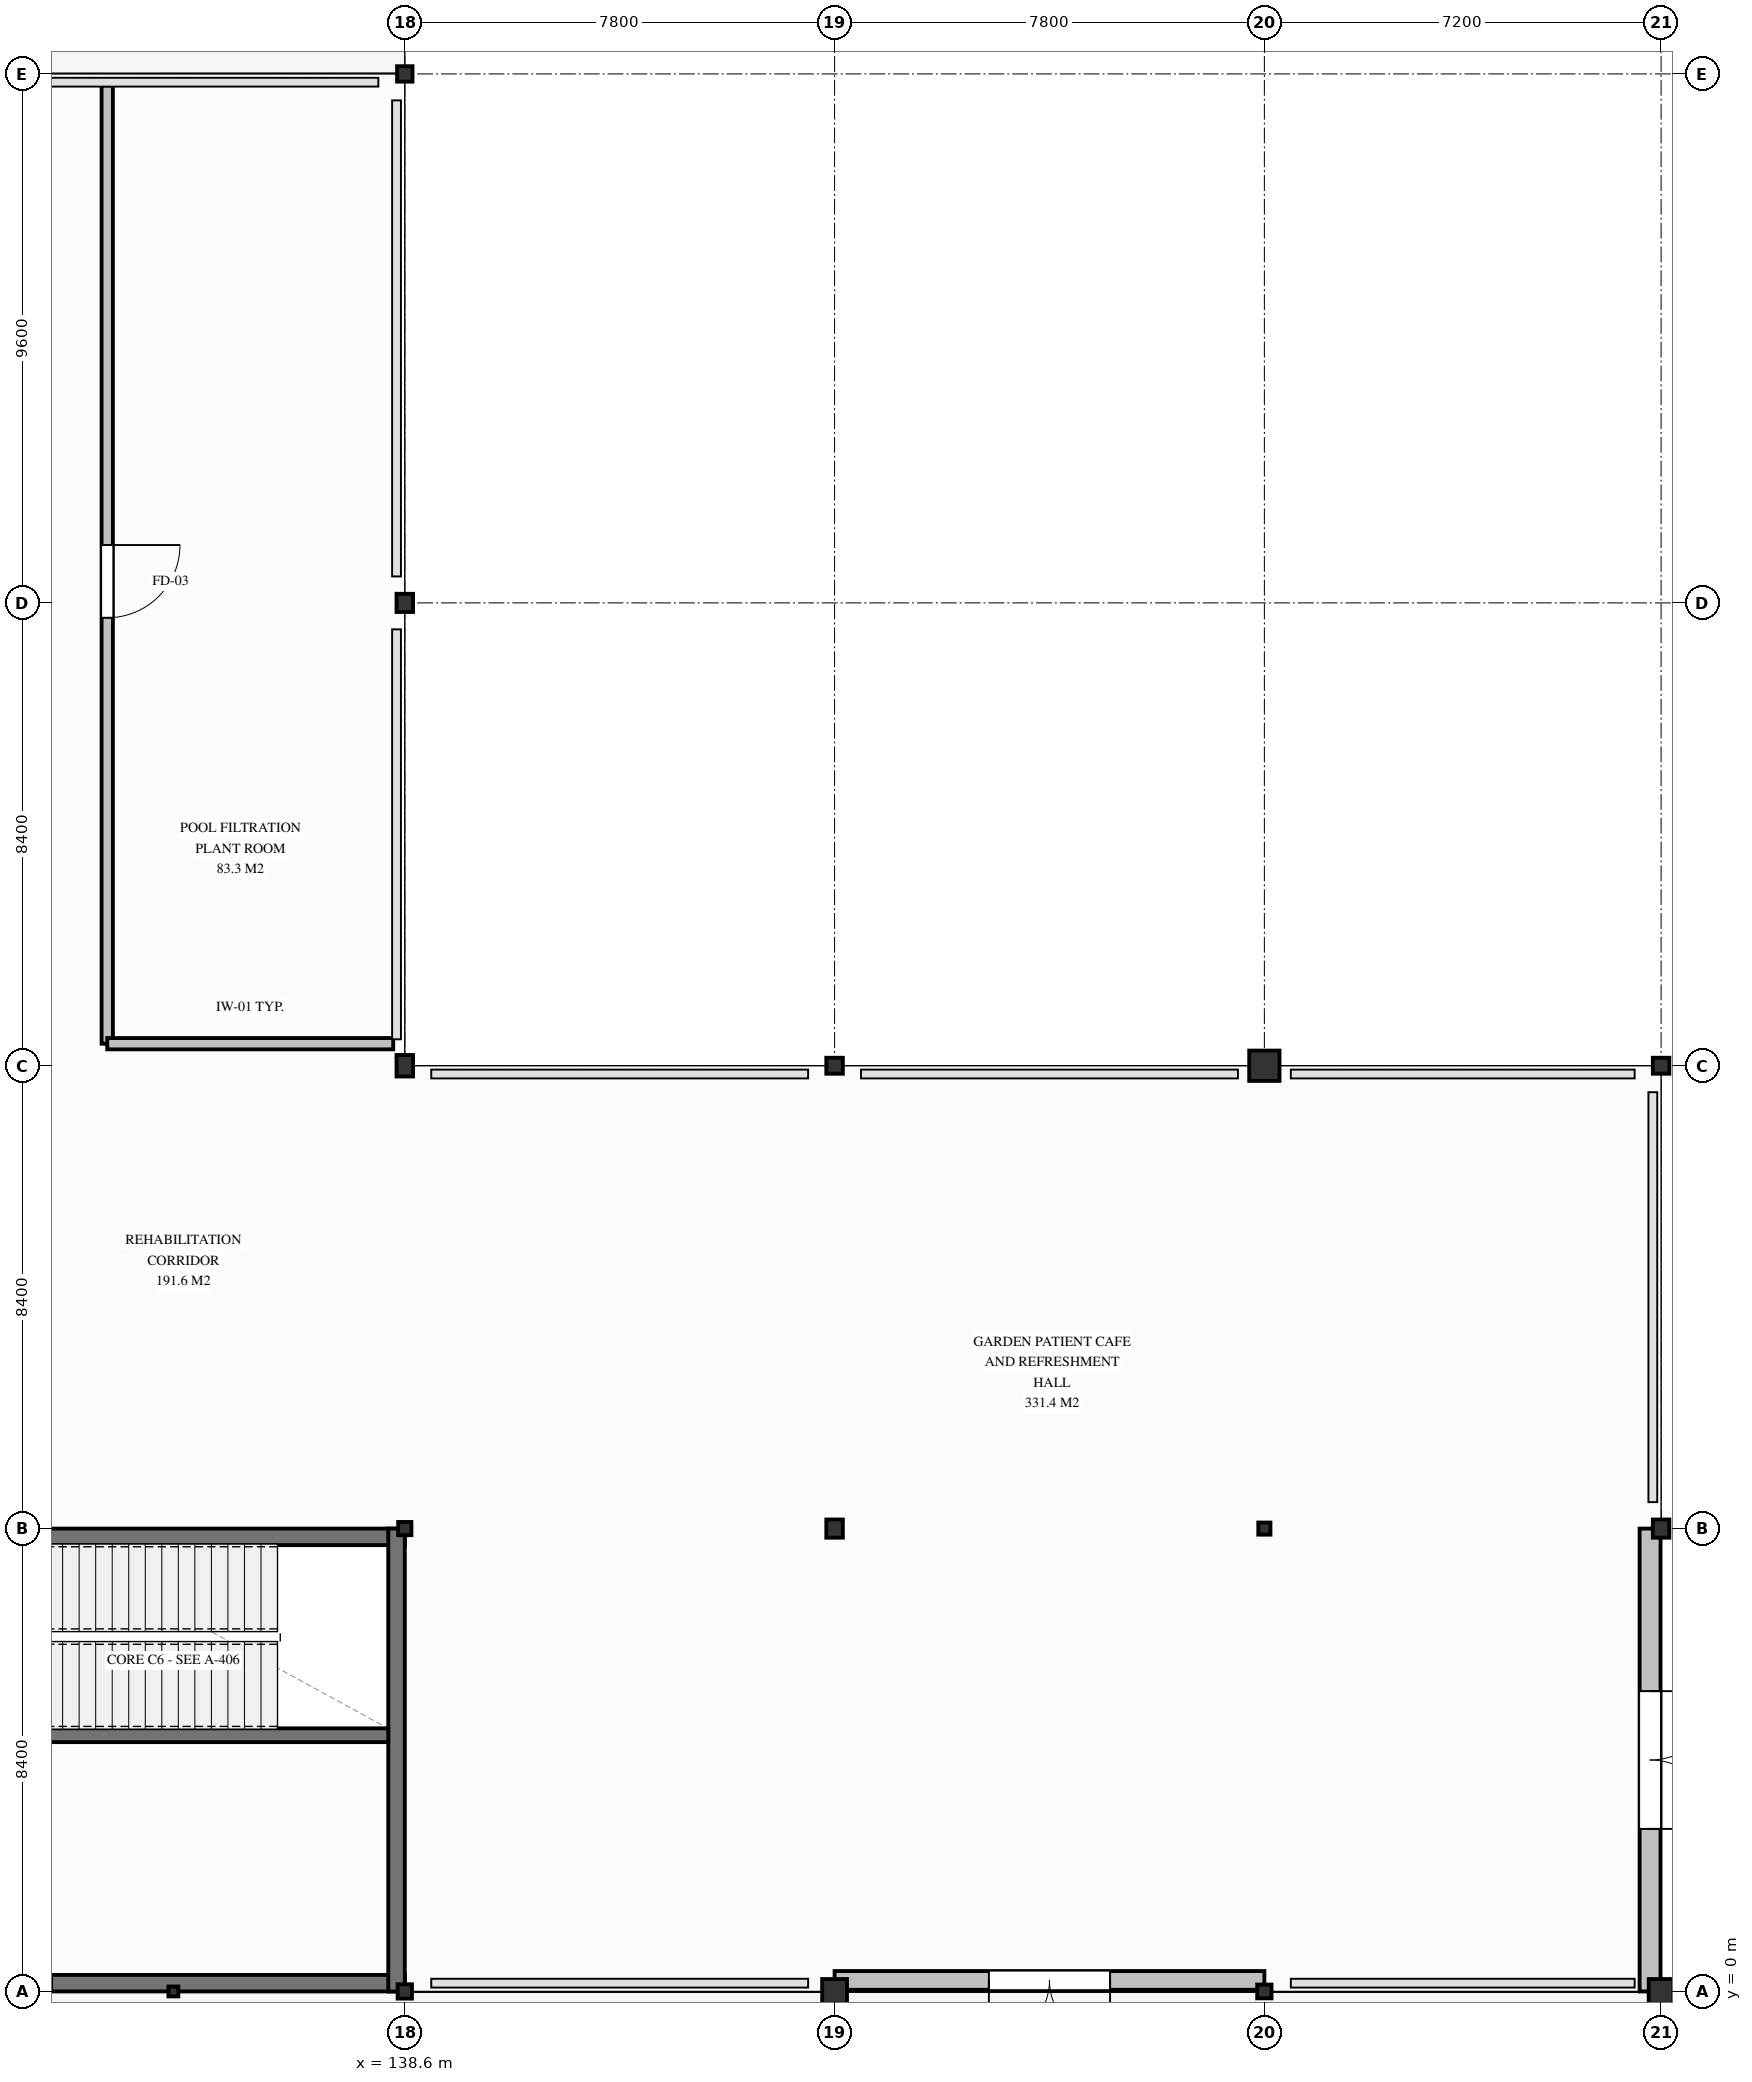
"""IFC4 building model, lengths in metres.
Left out: names, types, materials, properties, quantities, classifications, styles, units other than length and angle.
Written with IfcOpenShell. Run it as: python <this file> out.ifc"""

import sys

from ifc_helpers import new_model, si_unit, direction, frame, frame_2d, origin, origin_2d, place, context, subcontext, project, spatial, rectangle, hollow_rectangle, i_section, extrude, element, fill, save


model = new_model("IFC4")
c1 = context("Model", 3, precision=1e-05, world=origin(), true_north=direction((0.0, 1.0)))
c2 = subcontext(c1, "Body", "Model", "MODEL_VIEW")
j1 = project(units=[si_unit("LENGTHUNIT", "METRE"), si_unit("PLANEANGLEUNIT", "RADIAN")], contexts=[c1])
p1 = place(None, origin())
s1 = spatial("IfcSite", under=j1, at=p1, CompositionType="ELEMENT")
p2 = place(p1, origin())
s2 = spatial("IfcBuilding", under=s1, at=p2, CompositionType="ELEMENT")
p3 = place(p2, origin())
s3 = spatial("IfcBuildingStorey", under=s2, at=p3, CompositionType="ELEMENT", Elevation=0.0)
p4 = place(p3, frame((130.2, 8.25, 0.0), z_axis=(0.0, 0.0, 1.0), x_axis=(1.0, 0.0, 0.0)))
e1 = element("IfcWall", 1, at=p4, inside=s3, PredefinedType="SHEAR", context=c2, shape_type="SweptSolid", body=[
    extrude(rectangle(XDim=8.4, YDim=0.3, at=frame_2d((4.2, 0.0))), origin(), (0.0, 0.0, 1.0), 4.5),
])
p5 = place(p4, frame((0.8, 0.0, 0.0)))
e2 = element("IfcOpeningElement", 2, at=p5, cuts=e1, PredefinedType="OPENING", context=c2, shape_type="SweptSolid", body=[
    extrude(rectangle(XDim=1.1, YDim=2.15, at=frame_2d((0.55, 1.075))), frame((0.0, 0.16, 0.0), z_axis=(0.0, -1.0, 0.0), x_axis=(1.0, 0.0, 0.0)), (0.0, 0.0, 1.0), 0.32),
])
p6 = place(p3, frame((138.6, 0.15, 0.0), z_axis=(0.0, 0.0, 1.0), x_axis=(-1.0, 0.0, 0.0)))
e3 = element("IfcWall", 3, at=p6, inside=s3, PredefinedType="SHEAR", context=c2, shape_type="SweptSolid", body=[
    extrude(rectangle(XDim=8.4, YDim=0.3, at=frame_2d((4.2, 0.0))), origin(), (0.0, 0.0, 1.0), 4.5),
])
p7 = place(p6, frame((6.4, 0.0, 0.0)))
e4 = element("IfcOpeningElement", 4, at=p7, cuts=e3, PredefinedType="OPENING", context=c2, shape_type="SweptSolid", body=[
    extrude(rectangle(XDim=1.3, YDim=2.25, at=frame_2d((0.65, 1.125))), frame((0.0, 0.16, 0.0), z_axis=(0.0, -1.0, 0.0), x_axis=(1.0, 0.0, 0.0)), (0.0, 0.0, 1.0), 0.32),
])
p8 = place(p3, frame((138.45, 0.0, 0.0), z_axis=(0.0, 0.0, 1.0), x_axis=(0.0, 1.0, 0.0)))
e5 = element("IfcWall", 5, at=p8, inside=s3, PredefinedType="SHEAR", context=c2, shape_type="SweptSolid", body=[
    extrude(rectangle(XDim=8.4, YDim=0.3, at=frame_2d((4.2, 0.0))), origin(), (0.0, 0.0, 1.0), 4.5),
])
p9 = place(p3, frame((130.5, 4.65, 0.0), z_axis=(0.0, 0.0, 1.0), x_axis=(1.0, 0.0, 0.0)))
e6 = element("IfcWall", 6, at=p9, inside=s3, PredefinedType="SHEAR", context=c2, shape_type="SweptSolid", body=[
    extrude(rectangle(XDim=7.8, YDim=0.25, at=frame_2d((3.9, 0.0))), origin(), (0.0, 0.0, 1.0), 4.5),
])
p10 = place(p3, frame((138.6, 0.0, 0.0), z_axis=(0.0, 0.0, 1.0), x_axis=(1.0, 0.0, 0.0)))
e7 = element("IfcColumn", 7, at=p10, inside=s3, PredefinedType="COLUMN", context=c2, shape_type="SweptSolid", body=[
    extrude(i_section(OverallWidth=0.26, OverallDepth=0.26, WebThickness=0.01, FlangeThickness=0.018, FilletRadius=0.024, at=origin_2d()), origin(), (0.0, 0.0, 1.0), 4.5),
])
p11 = place(p3, frame((138.6, 8.4, 0.0), z_axis=(0.0, 0.0, 1.0), x_axis=(1.0, 0.0, 0.0)))
e8 = element("IfcColumn", 8, at=p11, inside=s3, PredefinedType="COLUMN", context=c2, shape_type="SweptSolid", body=[
    extrude(i_section(OverallWidth=0.24, OverallDepth=0.24, WebThickness=0.01, FlangeThickness=0.017, FilletRadius=0.021, at=origin_2d()), origin(), (0.0, 0.0, 1.0), 4.5),
])
p12 = place(p3, frame((138.6, 16.8, 0.0), z_axis=(0.0, 0.0, 1.0), x_axis=(1.0, 0.0, 0.0)))
e9 = element("IfcColumn", 9, at=p12, inside=s3, PredefinedType="COLUMN", context=c2, shape_type="SweptSolid", body=[
    extrude(i_section(OverallWidth=0.3, OverallDepth=0.39, WebThickness=0.011, FlangeThickness=0.019, FilletRadius=0.027, at=origin_2d()), origin(), (0.0, 0.0, 1.0), 4.5),
])
p13 = place(p3, frame((138.6, 25.2, 0.0), z_axis=(0.0, 0.0, 1.0), x_axis=(1.0, 0.0, 0.0)))
e10 = element("IfcColumn", 10, at=p13, inside=s3, PredefinedType="COLUMN", context=c2, shape_type="SweptSolid", body=[
    extrude(i_section(OverallWidth=0.3, OverallDepth=0.33, WebThickness=0.01, FlangeThickness=0.017, FilletRadius=0.027, at=origin_2d()), origin(), (0.0, 0.0, 1.0), 4.5),
])
p14 = place(p3, frame((138.6, 34.8, 0.0), z_axis=(0.0, 0.0, 1.0), x_axis=(1.0, 0.0, 0.0)))
e11 = element("IfcColumn", 11, at=p14, inside=s3, PredefinedType="COLUMN", context=c2, shape_type="SweptSolid", body=[
    extrude(i_section(OverallWidth=0.28, OverallDepth=0.28, WebThickness=0.01, FlangeThickness=0.018, FilletRadius=0.024, at=origin_2d()), origin(), (0.0, 0.0, 1.0), 4.5),
])
p15 = place(p3, frame((146.4, 0.0, 0.0), z_axis=(0.0, 0.0, 1.0), x_axis=(1.0, 0.0, 0.0)))
e12 = element("IfcColumn", 12, at=p15, inside=s3, PredefinedType="COLUMN", context=c2, shape_type="SweptSolid", body=[
    extrude(rectangle(XDim=0.45, YDim=0.45, at=origin_2d()), origin(), (0.0, 0.0, 1.0), 4.5),
])
p16 = place(p3, frame((146.4, 8.4, 0.0), z_axis=(0.0, 0.0, 1.0), x_axis=(1.0, 0.0, 0.0)))
e13 = element("IfcColumn", 13, at=p16, inside=s3, PredefinedType="COLUMN", context=c2, shape_type="SweptSolid", body=[
    extrude(i_section(OverallWidth=0.3, OverallDepth=0.33, WebThickness=0.01, FlangeThickness=0.017, FilletRadius=0.027, at=origin_2d()), origin(), (0.0, 0.0, 1.0), 4.5),
])
p17 = place(p3, frame((146.4, 16.8, 0.0), z_axis=(0.0, 0.0, 1.0), x_axis=(1.0, 0.0, 0.0)))
e14 = element("IfcColumn", 14, at=p17, inside=s3, PredefinedType="COLUMN", context=c2, shape_type="SweptSolid", body=[
    extrude(i_section(OverallWidth=0.3, OverallDepth=0.29, WebThickness=0.009, FlangeThickness=0.014, FilletRadius=0.027, at=origin_2d()), origin(), (0.0, 0.0, 1.0), 4.5),
])
p18 = place(p3, frame((154.2, 0.0, 0.0), z_axis=(0.0, 0.0, 1.0), x_axis=(1.0, 0.0, 0.0)))
e15 = element("IfcColumn", 15, at=p18, inside=s3, PredefinedType="COLUMN", context=c2, shape_type="SweptSolid", body=[
    extrude(i_section(OverallWidth=0.26, OverallDepth=0.25, WebThickness=0.008, FlangeThickness=0.012, FilletRadius=0.024, at=origin_2d()), origin(), (0.0, 0.0, 1.0), 4.5),
])
p19 = place(p3, frame((154.2, 8.4, 0.0), z_axis=(0.0, 0.0, 1.0), x_axis=(1.0, 0.0, 0.0)))
e16 = element("IfcColumn", 16, at=p19, inside=s3, PredefinedType="COLUMN", context=c2, shape_type="SweptSolid", body=[
    extrude(hollow_rectangle(XDim=0.22, YDim=0.22, WallThickness=0.012, InnerFilletRadius=0.019, OuterFilletRadius=0.031, at=origin_2d()), origin(), (0.0, 0.0, 1.0), 4.5),
])
p20 = place(p3, frame((154.2, 16.8, 0.0), z_axis=(0.0, 0.0, 1.0), x_axis=(1.0, 0.0, 0.0)))
e17 = element("IfcColumn", 17, at=p20, inside=s3, PredefinedType="COLUMN", context=c2, shape_type="SweptSolid", body=[
    extrude(rectangle(XDim=0.55, YDim=0.55, at=origin_2d()), origin(), (0.0, 0.0, 1.0), 4.5),
])
p21 = place(p3, frame((161.4, 0.0, 0.0), z_axis=(0.0, 0.0, 1.0), x_axis=(1.0, 0.0, 0.0)))
e18 = element("IfcColumn", 18, at=p21, inside=s3, PredefinedType="COLUMN", context=c2, shape_type="SweptSolid", body=[
    extrude(rectangle(XDim=0.45, YDim=0.45, at=origin_2d()), origin(), (0.0, 0.0, 1.0), 4.5),
])
p22 = place(p3, frame((161.4, 8.4, 0.0), z_axis=(0.0, 0.0, 1.0), x_axis=(1.0, 0.0, 0.0)))
e19 = element("IfcColumn", 19, at=p22, inside=s3, PredefinedType="COLUMN", context=c2, shape_type="SweptSolid", body=[
    extrude(i_section(OverallWidth=0.3, OverallDepth=0.33, WebThickness=0.01, FlangeThickness=0.017, FilletRadius=0.027, at=origin_2d()), origin(), (0.0, 0.0, 1.0), 4.5),
])
p23 = place(p3, frame((161.4, 16.8, 0.0), z_axis=(0.0, 0.0, 1.0), x_axis=(1.0, 0.0, 0.0)))
e20 = element("IfcColumn", 20, at=p23, inside=s3, PredefinedType="COLUMN", context=c2, shape_type="SweptSolid", body=[
    extrude(i_section(OverallWidth=0.3, OverallDepth=0.29, WebThickness=0.009, FlangeThickness=0.014, FilletRadius=0.027, at=origin_2d()), origin(), (0.0, 0.0, 1.0), 4.5),
])
p24 = place(p3, frame((134.4, 0.0, 0.0), z_axis=(0.0, 0.0, 1.0), x_axis=(1.0, 0.0, 0.0)))
e21 = element("IfcColumn", 21, at=p24, inside=s3, PredefinedType="PILASTER", context=c2, shape_type="SweptSolid", body=[
    extrude(hollow_rectangle(XDim=0.18, YDim=0.18, WallThickness=0.01, InnerFilletRadius=0.015, OuterFilletRadius=0.025, at=origin_2d()), origin(), (0.0, 0.0, 1.0), 4.5),
])
p25 = place(p3, frame((154.2, 0.2, 0.0), z_axis=(0.0, 0.0, 1.0), x_axis=(-1.0, 0.0, 0.0)))
e22 = element("IfcWall", 22, at=p25, inside=s3, PredefinedType="SOLIDWALL", context=c2, shape_type="SweptSolid", body=[
    extrude(rectangle(XDim=7.8, YDim=0.34, at=frame_2d((3.9, 0.0))), origin(), (0.0, 0.0, 1.0), 3.628),
])
p26 = place(p25, frame((2.8, 0.0, 0.0)))
e23 = element("IfcOpeningElement", 23, at=p26, cuts=e22, PredefinedType="OPENING", context=c2, shape_type="SweptSolid", body=[
    extrude(rectangle(XDim=2.2, YDim=2.5, at=frame_2d((1.1, 1.25))), frame((0.0, 0.18, 0.0), z_axis=(0.0, -1.0, 0.0), x_axis=(1.0, 0.0, 0.0)), (0.0, 0.0, 1.0), 0.36),
])
p27 = place(p3, frame((161.2, 8.4, 0.0), z_axis=(0.0, 0.0, 1.0), x_axis=(0.0, -1.0, 0.0)))
e24 = element("IfcWall", 24, at=p27, inside=s3, PredefinedType="SOLIDWALL", context=c2, shape_type="SweptSolid", body=[
    extrude(rectangle(XDim=8.4, YDim=0.38, at=frame_2d((4.2, 0.0))), origin(), (0.0, 0.0, 1.0), 3.898),
])
p28 = place(p27, frame((2.95, 0.0, 0.0)))
e25 = element("IfcOpeningElement", 25, at=p28, cuts=e24, PredefinedType="OPENING", context=c2, shape_type="SweptSolid", body=[
    extrude(rectangle(XDim=2.5, YDim=2.35, at=frame_2d((1.25, 1.175))), frame((0.0, 0.2, 0.0), z_axis=(0.0, -1.0, 0.0), x_axis=(1.0, 0.0, 0.0)), (0.0, 0.0, 1.0), 0.4),
])
p29 = place(p3, frame((133.2, 34.59, 0.0), z_axis=(0.0, 0.0, 1.0), x_axis=(0.0, -1.0, 0.0)))
e26 = element("IfcWall", 26, at=p29, inside=s3, PredefinedType="PARTITIONING", context=c2, shape_type="SweptSolid", body=[
    extrude(rectangle(XDim=17.39, YDim=0.205, at=frame_2d((8.695, 0.0))), origin(), (0.0, 0.0, 1.0), 3.958),
])
p30 = place(p29, frame((8.34, 0.0, 0.0)))
e27 = element("IfcOpeningElement", 27, at=p30, cuts=e26, PredefinedType="OPENING", context=c2, shape_type="SweptSolid", body=[
    extrude(rectangle(XDim=1.32, YDim=2.18, at=frame_2d((0.66, 1.09))), frame((0.0, 0.113, 0.0), z_axis=(0.0, -1.0, 0.0), x_axis=(1.0, 0.0, 0.0)), (0.0, 0.0, 1.0), 0.225),
])
p31 = place(p3, frame((133.2, 17.2, 0.0), z_axis=(0.0, 0.0, 1.0), x_axis=(1.0, 0.0, 0.0)))
e28 = element("IfcWall", 28, at=p31, inside=s3, PredefinedType="PARTITIONING", context=c2, shape_type="SweptSolid", body=[
    extrude(rectangle(XDim=5.19, YDim=0.205, at=frame_2d((2.595, 0.0))), origin(), (0.0, 0.0, 1.0), 3.938),
])
p32 = place(p26, origin())
e29 = element("IfcDoor", 29, at=p32, inside=s3, OperationType="DOUBLE_DOOR_SINGLE_SWING", PredefinedType="DOOR", context=c2, shape_type="SweptSolid", body=[
    extrude(rectangle(XDim=2.2, YDim=2.5, at=frame_2d((1.1, 1.25))), frame((0.0, 0.025, 0.0), z_axis=(0.0, -1.0, 0.0), x_axis=(1.0, 0.0, 0.0)), (0.0, 0.0, 1.0), 0.05),
])
fill(e23, e29)
p33 = place(p28, origin())
e30 = element("IfcDoor", 30, at=p33, inside=s3, OperationType="DOUBLE_DOOR_SINGLE_SWING", PredefinedType="GATE", context=c2, shape_type="SweptSolid", body=[
    extrude(rectangle(XDim=2.5, YDim=2.35, at=frame_2d((1.25, 1.175))), frame((0.0, 0.025, 0.0), z_axis=(0.0, -1.0, 0.0), x_axis=(1.0, 0.0, 0.0)), (0.0, 0.0, 1.0), 0.05),
])
fill(e25, e30)
p34 = place(p7, origin())
e31 = element("IfcDoor", 31, at=p34, inside=s3, OperationType="SINGLE_SWING_RIGHT", PredefinedType="DOOR", context=c2, shape_type="SweptSolid", body=[
    extrude(rectangle(XDim=1.3, YDim=2.25, at=frame_2d((0.65, 1.125))), frame((0.0, 0.025, 0.0), z_axis=(0.0, -1.0, 0.0), x_axis=(1.0, 0.0, 0.0)), (0.0, 0.0, 1.0), 0.05),
])
fill(e4, e31)
p35 = place(p30, origin())
e32 = element("IfcDoor", 32, at=p35, inside=s3, OperationType="SINGLE_SWING_LEFT", PredefinedType="DOOR", context=c2, shape_type="SweptSolid", body=[
    extrude(rectangle(XDim=1.32, YDim=2.18, at=frame_2d((0.66, 1.09))), frame((0.0, 0.025, 0.0), z_axis=(0.0, -1.0, 0.0), x_axis=(1.0, 0.0, 0.0)), (0.0, 0.0, 1.0), 0.05),
])
fill(e27, e32)
save(model, sys.argv[1])
